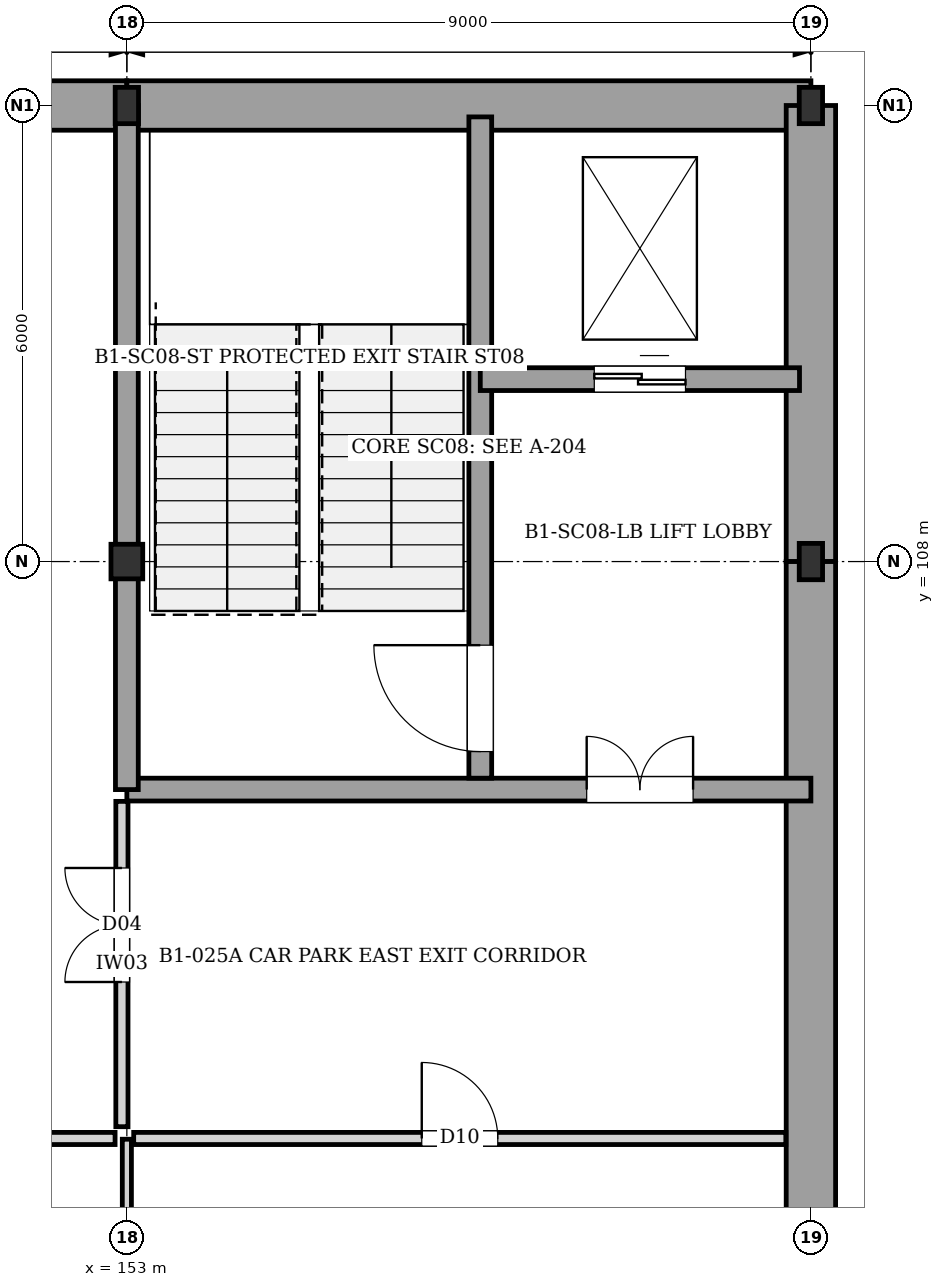
"""IFC4 building model, lengths in metres.
Left out: names, types, materials, properties, quantities, classifications, styles, units other than length and angle.
Written with IfcOpenShell. Run it as: python <this file> out.ifc"""

import sys

from ifc_helpers import new_model, si_unit, direction, frame, frame_2d, origin, origin_2d, place, context, subcontext, project, spatial, rectangle, i_section, extrude, element, fill, save


model = new_model("IFC4")
c1 = context("Model", 3, precision=1e-05, world=origin(), true_north=direction((0.0, 1.0)))
c2 = subcontext(c1, "Body", "Model", "MODEL_VIEW")
j1 = project(units=[si_unit("LENGTHUNIT", "METRE"), si_unit("PLANEANGLEUNIT", "RADIAN")], contexts=[c1])
p1 = place(None, origin())
s1 = spatial("IfcSite", under=j1, at=p1, CompositionType="ELEMENT")
p2 = place(p1, origin())
s2 = spatial("IfcBuilding", under=s1, at=p2, CompositionType="ELEMENT")
p3 = place(p2, frame((0.0, 0.0, -4.48)))
s3 = spatial("IfcBuildingStorey", under=s2, at=p3, CompositionType="ELEMENT", Elevation=-4.48)
p4 = place(p3, frame((153.0, 108.0, 0.0), z_axis=(0.0, 0.0, 1.0), x_axis=(1.0, 0.0, 0.0)))
e1 = element("IfcColumn", 1, at=p4, inside=s3, PredefinedType="COLUMN", context=c2, shape_type="SweptSolid", body=[
    extrude(i_section(OverallWidth=0.418, OverallDepth=0.455, WebThickness=0.032, FlangeThickness=0.056, at=origin_2d()), origin(), (0.0, 0.0, 1.0), 4.48),
])
for number, where, z_axis, x_axis in (
    (2, (153.0, 114.0, 0.0), (0.0, 0.0, 1.0), (1.0, 0.0, 0.0)),
    (3, (162.0, 108.0, 0.0), (0.0, 0.0, 1.0), (1.0, 0.0, 0.0)),
    (4, (162.0, 114.0, 0.0), (0.0, 0.0, 1.0), (1.0, 0.0, 0.0)),
):
    element("IfcColumn", number, at=place(p3, frame(where, z_axis=z_axis, x_axis=x_axis)), inside=s3, PredefinedType="COLUMN", context=c2, shape_type="SweptSolid", body=[
        extrude(i_section(OverallWidth=0.307, OverallDepth=0.478, WebThickness=0.021, FlangeThickness=0.04, at=origin_2d()), origin(), (0.0, 0.0, 1.0), 4.48),
    ])
for number, where, z_axis, x_axis in (
    (5, (144.0, 114.0, 0.0), (0.0, 0.0, 1.0), (1.0, 0.0, 0.0)),
    (6, (153.0, 114.0, 0.0), (0.0, 0.0, 1.0), (1.0, 0.0, 0.0)),
):
    element("IfcWall", number, at=place(p3, frame(where, z_axis=z_axis, x_axis=x_axis)), inside=s3, PredefinedType="USERDEFINED", context=c2, shape_type="SweptSolid", body=[
        extrude(rectangle(XDim=9.0, YDim=0.65, at=frame_2d((4.5, 0.0))), origin(), (0.0, 0.0, 1.0), 4.14),
    ])
p5 = place(p3, frame((162.0, 114.0, 0.0), z_axis=(0.0, 0.0, 1.0), x_axis=(0.0, -1.0, 0.0)))
e7 = element("IfcWall", 7, at=p5, inside=s3, PredefinedType="USERDEFINED", context=c2, shape_type="SweptSolid", body=[
    extrude(rectangle(XDim=6.0, YDim=0.65, at=frame_2d((3.0, 0.0))), origin(), (0.0, 0.0, 1.0), 4.14),
])
p6 = place(p3, frame((162.0, 108.0, 0.0), z_axis=(0.0, 0.0, 1.0), x_axis=(0.0, -1.0, 0.0)))
e8 = element("IfcWall", 8, at=p6, inside=s3, PredefinedType="USERDEFINED", context=c2, shape_type="SweptSolid", body=[
    extrude(rectangle(XDim=9.0, YDim=0.65, at=frame_2d((4.5, 0.0))), origin(), (0.0, 0.0, 1.0), 4.14),
])
p7 = place(p3, frame((153.0, 105.0, 0.0), z_axis=(0.0, 0.0, 1.0), x_axis=(1.0, 0.0, 0.0)))
e9 = element("IfcWall", 9, at=p7, inside=s3, PredefinedType="SHEAR", context=c2, shape_type="SweptSolid", body=[
    extrude(rectangle(XDim=9.0, YDim=0.3, at=frame_2d((4.5, 0.0))), origin(), (0.0, 0.0, 1.0), 4.14),
])
p8 = place(p7, frame((6.05, 0.0, 0.0)))
e10 = element("IfcOpeningElement", 10, at=p8, cuts=e9, PredefinedType="OPENING", context=c2, shape_type="SweptSolid", body=[
    extrude(rectangle(XDim=1.4, YDim=2.02, at=frame_2d((0.7, 1.01))), frame((0.0, 0.16, 0.0), z_axis=(0.0, -1.0, 0.0), x_axis=(1.0, 0.0, 0.0)), (0.0, 0.0, 1.0), 0.32),
])
p9 = place(p3, frame((153.0, 105.0, 0.0), z_axis=(0.0, 0.0, 1.0), x_axis=(0.0, 1.0, 0.0)))
e11 = element("IfcWall", 11, at=p9, inside=s3, PredefinedType="SHEAR", context=c2, shape_type="SweptSolid", body=[
    extrude(rectangle(XDim=9.0, YDim=0.3, at=frame_2d((4.5, 0.0))), origin(), (0.0, 0.0, 1.0), 4.14),
])
p10 = place(p3, frame((157.65, 105.15, 0.0), z_axis=(0.0, 0.0, 1.0), x_axis=(0.0, 1.0, 0.0)))
e12 = element("IfcWall", 12, at=p10, inside=s3, PredefinedType="SHEAR", context=c2, shape_type="SweptSolid", body=[
    extrude(rectangle(XDim=8.7, YDim=0.3, at=frame_2d((4.35, 0.0))), origin(), (0.0, 0.0, 1.0), 4.14),
])
p11 = place(p10, frame((0.35, 0.0, 0.0)))
e13 = element("IfcOpeningElement", 13, at=p11, cuts=e12, PredefinedType="OPENING", context=c2, shape_type="SweptSolid", body=[
    extrude(rectangle(XDim=1.4, YDim=2.02, at=frame_2d((0.7, 1.01))), frame((0.0, 0.16, 0.0), z_axis=(0.0, -1.0, 0.0), x_axis=(1.0, 0.0, 0.0)), (0.0, 0.0, 1.0), 0.32),
])
p12 = place(p3, frame((157.65, 110.4, 0.0), z_axis=(0.0, 0.0, 1.0), x_axis=(1.0, 0.0, 0.0)))
e14 = element("IfcWall", 14, at=p12, inside=s3, PredefinedType="SHEAR", context=c2, shape_type="SweptSolid", body=[
    extrude(rectangle(XDim=4.2, YDim=0.3, at=frame_2d((2.1, 0.0))), origin(), (0.0, 0.0, 1.0), 4.14),
])
p13 = place(p12, frame((1.5, 0.0, 0.0)))
e15 = element("IfcOpeningElement", 15, at=p13, cuts=e14, PredefinedType="OPENING", context=c2, shape_type="SweptSolid", body=[
    extrude(rectangle(XDim=1.2, YDim=2.2, at=frame_2d((0.6, 1.1))), frame((0.0, 0.16, 0.0), z_axis=(0.0, -1.0, 0.0), x_axis=(1.0, 0.0, 0.0)), (0.0, 0.0, 1.0), 0.32),
])
p14 = place(p3, frame((153.0, 72.33, 0.0), z_axis=(0.0, 0.0, 1.0), x_axis=(0.0, 1.0, 0.0)))
e16 = element("IfcWall", 16, at=p14, inside=s3, PredefinedType="PARTITIONING", context=c2, shape_type="SweptSolid", body=[
    extrude(rectangle(XDim=28.07, YDim=0.12, at=frame_2d((14.035, 0.0))), origin(), (0.0, 0.0, 1.0), 3.24),
])
p15 = place(p3, frame((108.22, 100.41, 0.0), z_axis=(0.0, 0.0, 1.0), x_axis=(1.0, 0.0, 0.0)))
e17 = element("IfcWall", 17, at=p15, inside=s3, PredefinedType="PARTITIONING", context=c2, shape_type="SweptSolid", body=[
    extrude(rectangle(XDim=44.625, YDim=0.16, at=frame_2d((22.312, 0.0))), origin(), (0.0, 0.0, 1.0), 4.14),
])
p16 = place(p15, frame((21.812, 0.0, 0.0)))
e18 = element("IfcOpeningElement", 18, at=p16, cuts=e17, PredefinedType="OPENING", context=c2, shape_type="SweptSolid", body=[
    extrude(rectangle(XDim=1.0, YDim=2.1, at=frame_2d((0.5, 1.05))), frame((0.0, 0.09, 0.0), z_axis=(0.0, -1.0, 0.0), x_axis=(1.0, 0.0, 0.0)), (0.0, 0.0, 1.0), 0.18),
])
p17 = place(p3, frame((152.935, 100.565, 0.0), z_axis=(0.0, 0.0, 1.0), x_axis=(0.0, 1.0, 0.0)))
e19 = element("IfcWall", 19, at=p17, inside=s3, PredefinedType="PARTITIONING", context=c2, shape_type="SweptSolid", body=[
    extrude(rectangle(XDim=4.28, YDim=0.16, at=frame_2d((2.14, 0.0))), origin(), (0.0, 0.0, 1.0), 3.24),
])
p18 = place(p17, frame((1.904, 0.0, 0.0)))
e20 = element("IfcOpeningElement", 20, at=p18, cuts=e19, PredefinedType="OPENING", context=c2, shape_type="SweptSolid", body=[
    extrude(rectangle(XDim=1.5, YDim=2.1, at=frame_2d((0.75, 1.05))), frame((0.0, 0.09, 0.0), z_axis=(0.0, -1.0, 0.0), x_axis=(1.0, 0.0, 0.0)), (0.0, 0.0, 1.0), 0.18),
])
p19 = place(p3, frame((153.09, 100.41, 0.0), z_axis=(0.0, 0.0, 1.0), x_axis=(1.0, 0.0, 0.0)))
e21 = element("IfcWall", 21, at=p19, inside=s3, PredefinedType="PARTITIONING", context=c2, shape_type="SweptSolid", body=[
    extrude(rectangle(XDim=8.58, YDim=0.16, at=frame_2d((4.29, 0.0))), origin(), (0.0, 0.0, 1.0), 4.14),
])
p20 = place(p19, frame((3.79, 0.0, 0.0)))
e22 = element("IfcOpeningElement", 22, at=p20, cuts=e21, PredefinedType="OPENING", context=c2, shape_type="SweptSolid", body=[
    extrude(rectangle(XDim=1.0, YDim=2.1, at=frame_2d((0.5, 1.05))), frame((0.0, 0.09, 0.0), z_axis=(0.0, -1.0, 0.0), x_axis=(1.0, 0.0, 0.0)), (0.0, 0.0, 1.0), 0.18),
])
p21 = place(p8, origin())
e23 = element("IfcDoor", 23, at=p21, inside=s3, OperationType="DOUBLE_DOOR_SINGLE_SWING", PredefinedType="DOOR", context=c2, shape_type="SweptSolid", body=[
    extrude(rectangle(XDim=1.4, YDim=2.02, at=frame_2d((0.7, 1.01))), frame((0.0, 0.025, 0.0), z_axis=(0.0, -1.0, 0.0), x_axis=(1.0, 0.0, 0.0)), (0.0, 0.0, 1.0), 0.05),
])
fill(e10, e23)
p22 = place(p11, origin())
e24 = element("IfcDoor", 24, at=p22, inside=s3, OperationType="SINGLE_SWING_RIGHT", PredefinedType="DOOR", context=c2, shape_type="SweptSolid", body=[
    extrude(rectangle(XDim=1.4, YDim=2.02, at=frame_2d((0.7, 1.01))), frame((0.0, 0.025, 0.0), z_axis=(0.0, -1.0, 0.0), x_axis=(1.0, 0.0, 0.0)), (0.0, 0.0, 1.0), 0.05),
])
fill(e13, e24)
p23 = place(p13, origin())
e25 = element("IfcDoor", 25, at=p23, inside=s3, OperationType="DOUBLE_DOOR_SLIDING", PredefinedType="DOOR", context=c2, shape_type="SweptSolid", body=[
    extrude(rectangle(XDim=1.2, YDim=2.2, at=frame_2d((0.6, 1.1))), frame((0.0, 0.025, 0.0), z_axis=(0.0, -1.0, 0.0), x_axis=(1.0, 0.0, 0.0)), (0.0, 0.0, 1.0), 0.05),
])
fill(e15, e25)
p24 = place(p18, origin())
e26 = element("IfcDoor", 26, at=p24, inside=s3, OperationType="DOUBLE_DOOR_SINGLE_SWING", PredefinedType="DOOR", context=c2, shape_type="SweptSolid", body=[
    extrude(rectangle(XDim=1.5, YDim=2.1, at=frame_2d((0.75, 1.05))), frame((0.0, 0.025, 0.0), z_axis=(0.0, -1.0, 0.0), x_axis=(1.0, 0.0, 0.0)), (0.0, 0.0, 1.0), 0.05),
])
fill(e20, e26)
p25 = place(p20, origin())
e27 = element("IfcDoor", 27, at=p25, inside=s3, OperationType="SINGLE_SWING_LEFT", PredefinedType="DOOR", context=c2, shape_type="SweptSolid", body=[
    extrude(rectangle(XDim=1.0, YDim=2.1, at=frame_2d((0.5, 1.05))), frame((0.0, 0.025, 0.0), z_axis=(0.0, -1.0, 0.0), x_axis=(1.0, 0.0, 0.0)), (0.0, 0.0, 1.0), 0.05),
])
fill(e22, e27)
save(model, sys.argv[1])
